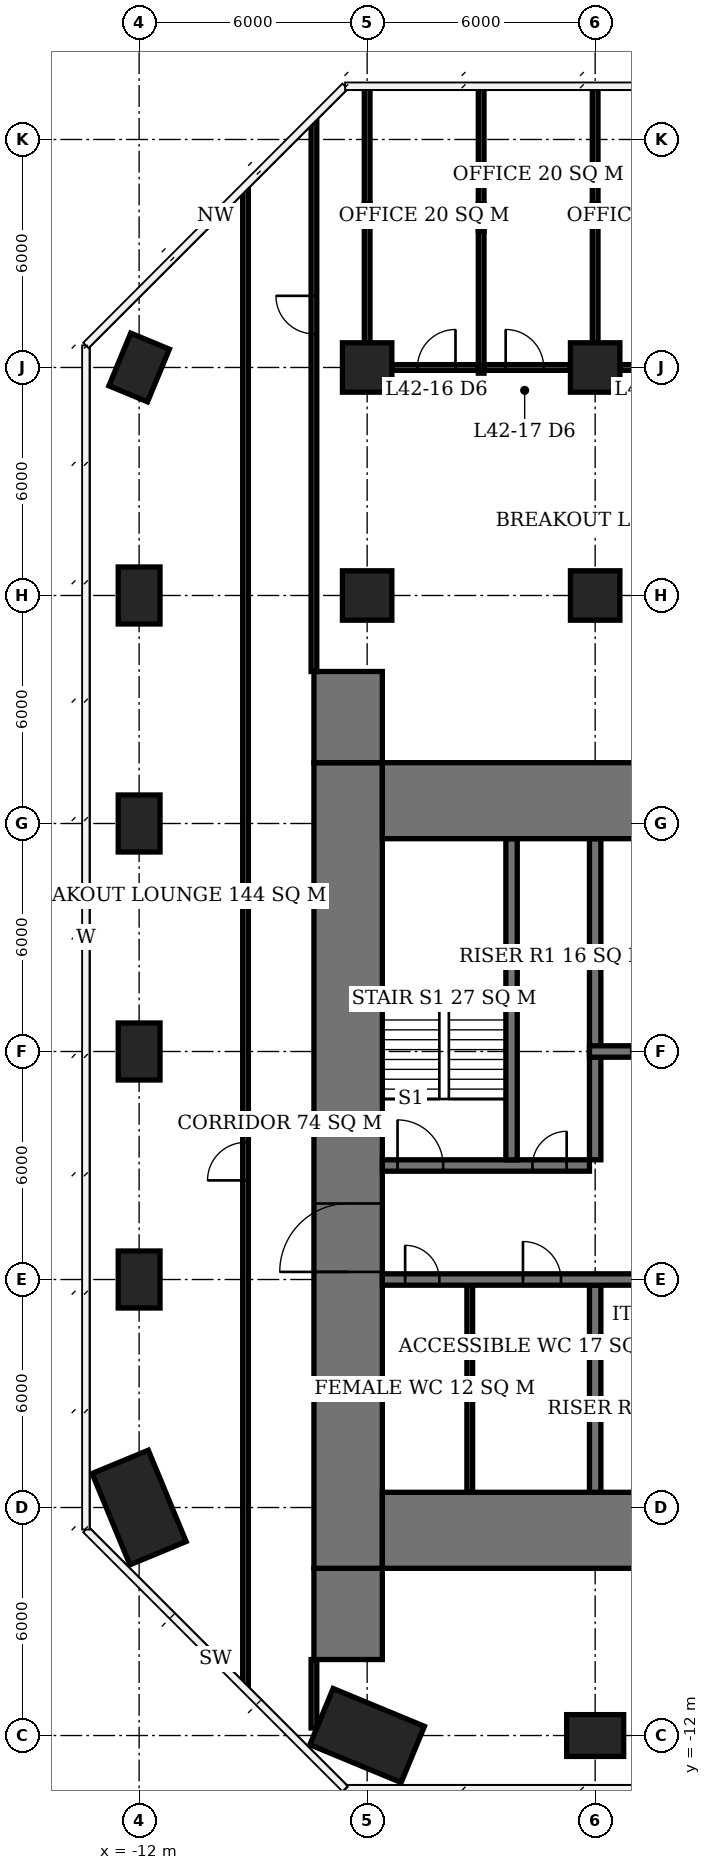
"""IFC4 building model, lengths in metres.
Left out: names, types, materials, properties, quantities, classifications, styles, units other than length and angle.
Written with IfcOpenShell. Run it as: python <this file> out.ifc"""

import sys

from ifc_helpers import new_model, si_unit, direction, frame, frame_2d, origin, origin_2d, place, context, subcontext, project, spatial, rectangle, extrude, element, fill, save


model = new_model("IFC4")
c1 = context("Model", 3, precision=1e-05, world=origin(), true_north=direction((0.0, 1.0)))
c2 = subcontext(c1, "Body", "Model", "MODEL_VIEW")
j1 = project(units=[si_unit("LENGTHUNIT", "METRE"), si_unit("PLANEANGLEUNIT", "RADIAN")], contexts=[c1])
p1 = place(None, origin())
s1 = spatial("IfcSite", under=j1, at=p1, CompositionType="ELEMENT")
p2 = place(p1, origin())
s2 = spatial("IfcBuilding", under=s1, at=p2, CompositionType="ELEMENT")
p3 = place(p2, frame((0.0, 0.0, 173.3)))
s3 = spatial("IfcBuildingStorey", under=s2, at=p3, CompositionType="ELEMENT", Elevation=173.3)
p4 = place(p3, frame((-12.0, -6.0, 0.0), z_axis=(0.0, 0.0, 1.0), x_axis=(-0.382683432365, 0.923879532511, 0.0)))
e1 = element("IfcColumn", 1, at=p4, inside=s3, PredefinedType="COLUMN", context=c2, shape_type="SweptSolid", body=[
    extrude(rectangle(XDim=2.6, YDim=1.6, at=origin_2d()), origin(), (0.0, 0.0, 1.0), 3.9),
])
for number, where, z_axis, x_axis in (
    (2, (-12.0, 0.0, 0.0), (0.0, 0.0, 1.0), (0.0, 1.0, 0.0)),
    (3, (-12.0, 6.0, 0.0), (0.0, 0.0, 1.0), (0.0, 1.0, 0.0)),
    (4, (-12.0, 12.0, 0.0), (0.0, 0.0, 1.0), (0.0, 1.0, 0.0)),
    (5, (-12.0, 18.0, 0.0), (0.0, 0.0, 1.0), (0.0, 1.0, 0.0)),
    (6, (-12.0, 24.0, 0.0), (0.0, 0.0, 1.0), (0.383, 0.924, 0.0)),
):
    element("IfcColumn", number, at=place(p3, frame(where, z_axis=z_axis, x_axis=x_axis)), inside=s3, PredefinedType="COLUMN", context=c2, shape_type="SweptSolid", body=[
        extrude(rectangle(XDim=1.5, YDim=1.1, at=origin_2d()), origin(), (0.0, 0.0, 1.0), 3.9),
    ])
p5 = place(p3, frame((-6.0, -12.0, 0.0), z_axis=(0.0, 0.0, 1.0), x_axis=(-0.923879532511, 0.382683432365, 0.0)))
e7 = element("IfcColumn", 7, at=p5, inside=s3, PredefinedType="COLUMN", context=c2, shape_type="SweptSolid", body=[
    extrude(rectangle(XDim=2.6, YDim=1.6, at=origin_2d()), origin(), (0.0, 0.0, 1.0), 3.9),
])
for number, where, z_axis, x_axis in (
    (8, (-6.0, 18.0, 0.0), (0.0, 0.0, 1.0), (1.0, 0.0, 0.0)),
    (9, (-6.0, 24.0, 0.0), (0.0, 0.0, 1.0), (1.0, 0.0, 0.0)),
):
    element("IfcColumn", number, at=place(p3, frame(where, z_axis=z_axis, x_axis=x_axis)), inside=s3, PredefinedType="COLUMN", context=c2, shape_type="SweptSolid", body=[
        extrude(rectangle(XDim=1.3, YDim=1.3, at=origin_2d()), origin(), (0.0, 0.0, 1.0), 3.9),
    ])
p6 = place(p3, frame((0.0, -12.0, 0.0), z_axis=(0.0, 0.0, 1.0), x_axis=(1.0, 0.0, 0.0)))
e10 = element("IfcColumn", 10, at=p6, inside=s3, PredefinedType="COLUMN", context=c2, shape_type="SweptSolid", body=[
    extrude(rectangle(XDim=1.5, YDim=1.1, at=origin_2d()), origin(), (0.0, 0.0, 1.0), 3.9),
])
for number, where, z_axis, x_axis in (
    (11, (0.0, 18.0, 0.0), (0.0, 0.0, 1.0), (1.0, 0.0, 0.0)),
    (12, (0.0, 24.0, 0.0), (0.0, 0.0, 1.0), (1.0, 0.0, 0.0)),
):
    element("IfcColumn", number, at=place(p3, frame(where, z_axis=z_axis, x_axis=x_axis)), inside=s3, PredefinedType="COLUMN", context=c2, shape_type="SweptSolid", body=[
        extrude(rectangle(XDim=1.3, YDim=1.3, at=origin_2d()), origin(), (0.0, 0.0, 1.0), 3.9),
    ])
for number, where, z_axis, x_axis in (
    (13, (-5.6, -6.6, 0.0), (0.0, 0.0, 1.0), (1.0, 0.0, 0.0)),
    (14, (-5.6, 12.6, 0.0), (0.0, 0.0, 1.0), (1.0, 0.0, 0.0)),
):
    element("IfcWall", number, at=place(p3, frame(where, z_axis=z_axis, x_axis=x_axis)), inside=s3, PredefinedType="SHEAR", context=c2, shape_type="SweptSolid", body=[
        extrude(rectangle(XDim=23.2, YDim=2.0, at=frame_2d((11.6, 0.0))), origin(), (0.0, 0.0, 1.0), 3.9),
    ])
p7 = place(p3, frame((-6.5, -7.6, 0.0), z_axis=(0.0, 0.0, 1.0), x_axis=(0.0, 1.0, 0.0)))
e15 = element("IfcWall", 15, at=p7, inside=s3, PredefinedType="SHEAR", context=c2, shape_type="SweptSolid", body=[
    extrude(rectangle(XDim=21.2, YDim=1.8, at=frame_2d((10.6, 0.0))), origin(), (0.0, 0.0, 1.0), 3.9),
])
p8 = place(p7, frame((7.8, 0.0, 0.0)))
e16 = element("IfcOpeningElement", 16, at=p8, cuts=e15, PredefinedType="OPENING", context=c2, shape_type="SweptSolid", body=[
    extrude(rectangle(XDim=1.8, YDim=2.4, at=frame_2d((0.9, 1.2))), frame((0.0, 0.91, 0.0), z_axis=(0.0, -1.0, 0.0), x_axis=(1.0, 0.0, 0.0)), (0.0, 0.0, 1.0), 1.82),
])
for number, where, z_axis, x_axis in (
    (17, (-6.5, -10.0, 0.0), (0.0, 0.0, 1.0), (0.0, 1.0, 0.0)),
    (18, (-6.5, 13.6, 0.0), (0.0, 0.0, 1.0), (0.0, 1.0, 0.0)),
):
    element("IfcWall", number, at=place(p3, frame(where, z_axis=z_axis, x_axis=x_axis)), inside=s3, PredefinedType="SHEAR", context=c2, shape_type="SweptSolid", body=[
        extrude(rectangle(XDim=2.4, YDim=1.8, at=frame_2d((1.2, 0.0))), origin(), (0.0, 0.0, 1.0), 3.9),
    ])
p9 = place(p3, frame((-5.6, 0.0, 0.0), z_axis=(0.0, 0.0, 1.0), x_axis=(1.0, 0.0, 0.0)))
e19 = element("IfcWall", 19, at=p9, inside=s3, PredefinedType="SHEAR", context=c2, shape_type="SweptSolid", body=[
    extrude(rectangle(XDim=17.75, YDim=0.3, at=frame_2d((8.875, 0.0))), origin(), (0.0, 0.0, 1.0), 3.9),
])
p10 = place(p9, frame((0.6, 0.0, 0.0)))
e20 = element("IfcOpeningElement", 20, at=p10, cuts=e19, PredefinedType="OPENING", context=c2, shape_type="SweptSolid", body=[
    extrude(rectangle(XDim=0.9, YDim=2.1, at=frame_2d((0.45, 1.05))), frame((0.0, 0.16, 0.0), z_axis=(0.0, -1.0, 0.0), x_axis=(1.0, 0.0, 0.0)), (0.0, 0.0, 1.0), 0.32),
])
p11 = place(p9, frame((3.7, 0.0, 0.0)))
e21 = element("IfcOpeningElement", 21, at=p11, cuts=e19, PredefinedType="OPENING", context=c2, shape_type="SweptSolid", body=[
    extrude(rectangle(XDim=1.0, YDim=2.1, at=frame_2d((0.5, 1.05))), frame((0.0, 0.16, 0.0), z_axis=(0.0, -1.0, 0.0), x_axis=(1.0, 0.0, 0.0)), (0.0, 0.0, 1.0), 0.32),
])
p12 = place(p9, frame((9.6, 0.0, 0.0)))
e22 = element("IfcOpeningElement", 22, at=p12, cuts=e19, PredefinedType="OPENING", context=c2, shape_type="SweptSolid", body=[
    extrude(rectangle(XDim=1.0, YDim=2.1, at=frame_2d((0.5, 1.05))), frame((0.0, 0.16, 0.0), z_axis=(0.0, -1.0, 0.0), x_axis=(1.0, 0.0, 0.0)), (0.0, 0.0, 1.0), 0.32),
])
p13 = place(p9, frame((12.55, 0.0, 0.0)))
e23 = element("IfcOpeningElement", 23, at=p13, cuts=e19, PredefinedType="OPENING", context=c2, shape_type="SweptSolid", body=[
    extrude(rectangle(XDim=1.1, YDim=2.1, at=frame_2d((0.55, 1.05))), frame((0.0, 0.16, 0.0), z_axis=(0.0, -1.0, 0.0), x_axis=(1.0, 0.0, 0.0)), (0.0, 0.0, 1.0), 0.32),
])
p14 = place(p9, frame((15.55, 0.0, 0.0)))
e24 = element("IfcOpeningElement", 24, at=p14, cuts=e19, PredefinedType="OPENING", context=c2, shape_type="SweptSolid", body=[
    extrude(rectangle(XDim=1.1, YDim=2.1, at=frame_2d((0.55, 1.05))), frame((0.0, 0.16, 0.0), z_axis=(0.0, -1.0, 0.0), x_axis=(1.0, 0.0, 0.0)), (0.0, 0.0, 1.0), 0.32),
])
p15 = place(p3, frame((-5.6, 3.0, 0.0), z_axis=(0.0, 0.0, 1.0), x_axis=(1.0, 0.0, 0.0)))
e25 = element("IfcWall", 25, at=p15, inside=s3, PredefinedType="SHEAR", context=c2, shape_type="SweptSolid", body=[
    extrude(rectangle(XDim=5.45, YDim=0.3, at=frame_2d((2.725, 0.0))), origin(), (0.0, 0.0, 1.0), 3.9),
])
p16 = place(p15, frame((0.4, 0.0, 0.0)))
e26 = element("IfcOpeningElement", 26, at=p16, cuts=e25, PredefinedType="OPENING", context=c2, shape_type="SweptSolid", body=[
    extrude(rectangle(XDim=1.2, YDim=2.1, at=frame_2d((0.6, 1.05))), frame((0.0, 0.16, 0.0), z_axis=(0.0, -1.0, 0.0), x_axis=(1.0, 0.0, 0.0)), (0.0, 0.0, 1.0), 0.32),
])
p17 = place(p15, frame((3.95, 0.0, 0.0)))
e27 = element("IfcOpeningElement", 27, at=p17, cuts=e25, PredefinedType="OPENING", context=c2, shape_type="SweptSolid", body=[
    extrude(rectangle(XDim=0.9, YDim=2.1, at=frame_2d((0.45, 1.05))), frame((0.0, 0.16, 0.0), z_axis=(0.0, -1.0, 0.0), x_axis=(1.0, 0.0, 0.0)), (0.0, 0.0, 1.0), 0.32),
])
p18 = place(p3, frame((-0.15, 6.0, 0.0), z_axis=(0.0, 0.0, 1.0), x_axis=(1.0, 0.0, 0.0)))
e28 = element("IfcWall", 28, at=p18, inside=s3, PredefinedType="SHEAR", context=c2, shape_type="SweptSolid", body=[
    extrude(rectangle(XDim=17.75, YDim=0.3, at=frame_2d((8.875, 0.0))), origin(), (0.0, 0.0, 1.0), 3.9),
])
p19 = place(p18, frame((13.15, 0.0, 0.0)))
e29 = element("IfcOpeningElement", 29, at=p19, cuts=e28, PredefinedType="OPENING", context=c2, shape_type="SweptSolid", body=[
    extrude(rectangle(XDim=0.9, YDim=2.1, at=frame_2d((0.45, 1.05))), frame((0.0, 0.16, 0.0), z_axis=(0.0, -1.0, 0.0), x_axis=(1.0, 0.0, 0.0)), (0.0, 0.0, 1.0), 0.32),
])
p20 = place(p18, frame((7.25, 0.0, 0.0)))
e30 = element("IfcOpeningElement", 30, at=p20, cuts=e28, PredefinedType="OPENING", context=c2, shape_type="SweptSolid", body=[
    extrude(rectangle(XDim=1.0, YDim=2.1, at=frame_2d((0.5, 1.05))), frame((0.0, 0.16, 0.0), z_axis=(0.0, -1.0, 0.0), x_axis=(1.0, 0.0, 0.0)), (0.0, 0.0, 1.0), 0.32),
])
p21 = place(p18, frame((1.1, 0.0, 0.0)))
e31 = element("IfcOpeningElement", 31, at=p21, cuts=e28, PredefinedType="OPENING", context=c2, shape_type="SweptSolid", body=[
    extrude(rectangle(XDim=1.1, YDim=2.1, at=frame_2d((0.55, 1.05))), frame((0.0, 0.16, 0.0), z_axis=(0.0, -1.0, 0.0), x_axis=(1.0, 0.0, 0.0)), (0.0, 0.0, 1.0), 0.32),
])
p22 = place(p18, frame((4.1, 0.0, 0.0)))
e32 = element("IfcOpeningElement", 32, at=p22, cuts=e28, PredefinedType="OPENING", context=c2, shape_type="SweptSolid", body=[
    extrude(rectangle(XDim=1.1, YDim=2.1, at=frame_2d((0.55, 1.05))), frame((0.0, 0.16, 0.0), z_axis=(0.0, -1.0, 0.0), x_axis=(1.0, 0.0, 0.0)), (0.0, 0.0, 1.0), 0.32),
])
p23 = place(p3, frame((0.0, -5.6, 0.0), z_axis=(0.0, 0.0, 1.0), x_axis=(0.0, 1.0, 0.0)))
e33 = element("IfcWall", 33, at=p23, inside=s3, PredefinedType="SHEAR", context=c2, shape_type="SweptSolid", body=[
    extrude(rectangle(XDim=5.45, YDim=0.3, at=frame_2d((2.725, 0.0))), origin(), (0.0, 0.0, 1.0), 3.9),
])
for number, where, z_axis, x_axis in (
    (34, (0.0, 3.15, 0.0), (0.0, 0.0, 1.0), (0.0, 1.0, 0.0)),
    (35, (-2.2, 3.15, 0.0), (0.0, 0.0, 1.0), (0.0, 1.0, 0.0)),
):
    element("IfcWall", number, at=place(p3, frame(where, z_axis=z_axis, x_axis=x_axis)), inside=s3, PredefinedType="SHEAR", context=c2, shape_type="SweptSolid", body=[
        extrude(rectangle(XDim=8.45, YDim=0.3, at=frame_2d((4.225, 0.0))), origin(), (0.0, 0.0, 1.0), 3.9),
    ])
p24 = place(p3, frame((-3.3, -5.6, 0.0), z_axis=(0.0, 0.0, 1.0), x_axis=(0.0, 1.0, 0.0)))
e36 = element("IfcWall", 36, at=p24, inside=s3, PredefinedType="PLUMBINGWALL", context=c2, shape_type="SweptSolid", body=[
    extrude(rectangle(XDim=5.45, YDim=0.15, at=frame_2d((2.725, 0.0))), origin(), (0.0, 0.0, 1.0), 3.65),
])
p25 = place(p3, frame((-5.35, 24.0, 0.0), z_axis=(0.0, 0.0, 1.0), x_axis=(1.0, 0.0, 0.0)))
e37 = element("IfcWall", 37, at=p25, inside=s3, PredefinedType="PARTITIONING", context=c2, shape_type="SweptSolid", body=[
    extrude(rectangle(XDim=2.275, YDim=0.15, at=frame_2d((1.138, 0.0))), origin(), (0.0, 0.0, 1.0), 3.65),
])
p26 = place(p25, frame((0.675, 0.0, 0.0)))
e38 = element("IfcOpeningElement", 38, at=p26, cuts=e37, PredefinedType="OPENING", context=c2, shape_type="SweptSolid", body=[
    extrude(rectangle(XDim=1.0, YDim=2.1, at=frame_2d((0.5, 1.05))), frame((0.0, 0.085, 0.0), z_axis=(0.0, -1.0, 0.0), x_axis=(1.0, 0.0, 0.0)), (0.0, 0.0, 1.0), 0.17),
])
p27 = place(p3, frame((-2.925, 24.0, 0.0), z_axis=(0.0, 0.0, 1.0), x_axis=(1.0, 0.0, 0.0)))
e39 = element("IfcWall", 39, at=p27, inside=s3, PredefinedType="PARTITIONING", context=c2, shape_type="SweptSolid", body=[
    extrude(rectangle(XDim=2.265, YDim=0.15, at=frame_2d((1.133, 0.0))), origin(), (0.0, 0.0, 1.0), 3.65),
])
p28 = place(p27, frame((0.57, 0.0, 0.0)))
e40 = element("IfcOpeningElement", 40, at=p28, cuts=e39, PredefinedType="OPENING", context=c2, shape_type="SweptSolid", body=[
    extrude(rectangle(XDim=1.0, YDim=2.1, at=frame_2d((0.5, 1.05))), frame((0.0, 0.085, 0.0), z_axis=(0.0, -1.0, 0.0), x_axis=(1.0, 0.0, 0.0)), (0.0, 0.0, 1.0), 0.17),
])
p29 = place(p3, frame((0.66, 24.0, 0.0), z_axis=(0.0, 0.0, 1.0), x_axis=(1.0, 0.0, 0.0)))
e41 = element("IfcWall", 41, at=p29, inside=s3, PredefinedType="PARTITIONING", context=c2, shape_type="SweptSolid", body=[
    extrude(rectangle(XDim=2.265, YDim=0.15, at=frame_2d((1.133, 0.0))), origin(), (0.0, 0.0, 1.0), 3.65),
])
p30 = place(p29, frame((0.695, 0.0, 0.0)))
e42 = element("IfcOpeningElement", 42, at=p30, cuts=e41, PredefinedType="OPENING", context=c2, shape_type="SweptSolid", body=[
    extrude(rectangle(XDim=1.0, YDim=2.1, at=frame_2d((0.5, 1.05))), frame((0.0, 0.085, 0.0), z_axis=(0.0, -1.0, 0.0), x_axis=(1.0, 0.0, 0.0)), (0.0, 0.0, 1.0), 0.17),
])
p31 = place(p3, frame((-6.0, 24.65, 0.0), z_axis=(0.0, 0.0, 1.0), x_axis=(0.0, 1.0, 0.0)))
e43 = element("IfcWall", 43, at=p31, inside=s3, PredefinedType="PARTITIONING", context=c2, shape_type="SweptSolid", body=[
    extrude(rectangle(XDim=3.66, YDim=0.15, at=frame_2d((1.83, 0.0))), origin(), (0.0, 0.0, 1.0), 2.65),
])
p32 = place(p3, frame((-6.0, 28.31, 0.0), z_axis=(0.0, 0.0, 1.0), x_axis=(0.0, 1.0, 0.0)))
e44 = element("IfcWall", 44, at=p32, inside=s3, PredefinedType="PARTITIONING", context=c2, shape_type="SweptSolid", body=[
    extrude(rectangle(XDim=3.09, YDim=0.15, at=frame_2d((1.545, 0.0))), origin(), (0.0, 0.0, 1.0), 3.65),
])
p33 = place(p3, frame((-3.0, 23.85, 0.0), z_axis=(0.0, 0.0, 1.0), x_axis=(0.0, 1.0, 0.0)))
e45 = element("IfcWall", 45, at=p33, inside=s3, PredefinedType="PARTITIONING", context=c2, shape_type="SweptSolid", body=[
    extrude(rectangle(XDim=3.74, YDim=0.15, at=frame_2d((1.87, 0.0))), origin(), (0.0, 0.0, 1.0), 3.65),
])
p34 = place(p3, frame((-3.0, 27.59, 0.0), z_axis=(0.0, 0.0, 1.0), x_axis=(0.0, 1.0, 0.0)))
e46 = element("IfcWall", 46, at=p34, inside=s3, PredefinedType="PARTITIONING", context=c2, shape_type="SweptSolid", body=[
    extrude(rectangle(XDim=0.72, YDim=0.15, at=frame_2d((0.36, 0.0))), origin(), (0.0, 0.0, 1.0), 2.65),
])
p35 = place(p3, frame((-3.0, 28.31, 0.0), z_axis=(0.0, 0.0, 1.0), x_axis=(0.0, 1.0, 0.0)))
e47 = element("IfcWall", 47, at=p35, inside=s3, PredefinedType="PARTITIONING", context=c2, shape_type="SweptSolid", body=[
    extrude(rectangle(XDim=3.09, YDim=0.15, at=frame_2d((1.545, 0.0))), origin(), (0.0, 0.0, 1.0), 3.65),
])
p36 = place(p3, frame((0.0, 24.65, 0.0), z_axis=(0.0, 0.0, 1.0), x_axis=(0.0, 1.0, 0.0)))
e48 = element("IfcWall", 48, at=p36, inside=s3, PredefinedType="PARTITIONING", context=c2, shape_type="SweptSolid", body=[
    extrude(rectangle(XDim=3.66, YDim=0.15, at=frame_2d((1.83, 0.0))), origin(), (0.0, 0.0, 1.0), 2.65),
])
p37 = place(p3, frame((0.0, 28.31, 0.0), z_axis=(0.0, 0.0, 1.0), x_axis=(0.0, 1.0, 0.0)))
e49 = element("IfcWall", 49, at=p37, inside=s3, PredefinedType="PARTITIONING", context=c2, shape_type="SweptSolid", body=[
    extrude(rectangle(XDim=3.09, YDim=0.15, at=frame_2d((1.545, 0.0))), origin(), (0.0, 0.0, 1.0), 3.65),
])
p38 = place(p3, frame((-9.2, -10.689, 0.0), z_axis=(0.0, 0.0, 1.0), x_axis=(0.0, 1.0, 0.0)))
e50 = element("IfcWall", 50, at=p38, inside=s3, PredefinedType="PARTITIONING", context=c2, shape_type="SweptSolid", body=[
    extrude(rectangle(XDim=39.378, YDim=0.15, at=frame_2d((19.689, 0.0))), origin(), (0.0, 0.0, 1.0), 3.65),
])
p39 = place(p38, frame((13.297, 0.0, 0.0)))
e51 = element("IfcOpeningElement", 51, at=p39, cuts=e50, PredefinedType="OPENING", context=c2, shape_type="SweptSolid", body=[
    extrude(rectangle(XDim=1.0, YDim=2.1, at=frame_2d((0.5, 1.05))), frame((0.0, 0.085, 0.0), z_axis=(0.0, -1.0, 0.0), x_axis=(1.0, 0.0, 0.0)), (0.0, 0.0, 1.0), 0.17),
])
p40 = place(p3, frame((-7.4, -11.802, 0.0), z_axis=(0.0, 0.0, 1.0), x_axis=(0.0, 1.0, 0.0)))
e52 = element("IfcWall", 52, at=p40, inside=s3, PredefinedType="PARTITIONING", context=c2, shape_type="SweptSolid", body=[
    extrude(rectangle(XDim=1.802, YDim=0.15, at=frame_2d((0.901, 0.0))), origin(), (0.0, 0.0, 1.0), 3.65),
])
p41 = place(p3, frame((-7.4, 16.0, 0.0), z_axis=(0.0, 0.0, 1.0), x_axis=(0.0, 1.0, 0.0)))
e53 = element("IfcWall", 53, at=p41, inside=s3, PredefinedType="PARTITIONING", context=c2, shape_type="SweptSolid", body=[
    extrude(rectangle(XDim=14.489, YDim=0.15, at=frame_2d((7.245, 0.0))), origin(), (0.0, 0.0, 1.0), 3.65),
])
p42 = place(p41, frame((8.885, 0.0, 0.0)))
e54 = element("IfcOpeningElement", 54, at=p42, cuts=e53, PredefinedType="OPENING", context=c2, shape_type="SweptSolid", body=[
    extrude(rectangle(XDim=1.0, YDim=2.1, at=frame_2d((0.5, 1.05))), frame((0.0, 0.085, 0.0), z_axis=(0.0, -1.0, 0.0), x_axis=(1.0, 0.0, 0.0)), (0.0, 0.0, 1.0), 0.17),
])
p43 = place(p8, origin())
e55 = element("IfcDoor", 55, at=p43, inside=s3, OperationType="DOUBLE_DOOR_SINGLE_SWING", PredefinedType="DOOR", context=c2, shape_type="SweptSolid", body=[
    extrude(rectangle(XDim=1.8, YDim=2.4, at=frame_2d((0.9, 1.2))), frame((0.0, 0.025, 0.0), z_axis=(0.0, -1.0, 0.0), x_axis=(1.0, 0.0, 0.0)), (0.0, 0.0, 1.0), 0.05),
])
fill(e16, e55)
p44 = place(p16, origin())
e56 = element("IfcDoor", 56, at=p44, inside=s3, OperationType="SINGLE_SWING_LEFT", PredefinedType="DOOR", context=c2, shape_type="SweptSolid", body=[
    extrude(rectangle(XDim=1.2, YDim=2.1, at=frame_2d((0.6, 1.05))), frame((0.0, 0.025, 0.0), z_axis=(0.0, -1.0, 0.0), x_axis=(1.0, 0.0, 0.0)), (0.0, 0.0, 1.0), 0.05),
])
fill(e26, e56)
p45 = place(p17, origin())
e57 = element("IfcDoor", 57, at=p45, inside=s3, OperationType="SINGLE_SWING_RIGHT", PredefinedType="DOOR", context=c2, shape_type="SweptSolid", body=[
    extrude(rectangle(XDim=0.9, YDim=2.1, at=frame_2d((0.45, 1.05))), frame((0.0, 0.025, 0.0), z_axis=(0.0, -1.0, 0.0), x_axis=(1.0, 0.0, 0.0)), (0.0, 0.0, 1.0), 0.05),
])
fill(e27, e57)
p46 = place(p10, origin())
e58 = element("IfcDoor", 58, at=p46, inside=s3, OperationType="SINGLE_SWING_LEFT", PredefinedType="DOOR", context=c2, shape_type="SweptSolid", body=[
    extrude(rectangle(XDim=0.9, YDim=2.1, at=frame_2d((0.45, 1.05))), frame((0.0, 0.025, 0.0), z_axis=(0.0, -1.0, 0.0), x_axis=(1.0, 0.0, 0.0)), (0.0, 0.0, 1.0), 0.05),
])
fill(e20, e58)
p47 = place(p11, origin())
e59 = element("IfcDoor", 59, at=p47, inside=s3, OperationType="SINGLE_SWING_LEFT", PredefinedType="DOOR", context=c2, shape_type="SweptSolid", body=[
    extrude(rectangle(XDim=1.0, YDim=2.1, at=frame_2d((0.5, 1.05))), frame((0.0, 0.025, 0.0), z_axis=(0.0, -1.0, 0.0), x_axis=(1.0, 0.0, 0.0)), (0.0, 0.0, 1.0), 0.05),
])
fill(e21, e59)
p48 = place(p26, origin())
e60 = element("IfcDoor", 60, at=p48, inside=s3, OperationType="SINGLE_SWING_RIGHT", PredefinedType="DOOR", context=c2, shape_type="SweptSolid", body=[
    extrude(rectangle(XDim=1.0, YDim=2.1, at=frame_2d((0.5, 1.05))), frame((0.0, 0.025, 0.0), z_axis=(0.0, -1.0, 0.0), x_axis=(1.0, 0.0, 0.0)), (0.0, 0.0, 1.0), 0.05),
])
fill(e38, e60)
p49 = place(p28, origin())
e61 = element("IfcDoor", 61, at=p49, inside=s3, OperationType="SINGLE_SWING_LEFT", PredefinedType="DOOR", context=c2, shape_type="SweptSolid", body=[
    extrude(rectangle(XDim=1.0, YDim=2.1, at=frame_2d((0.5, 1.05))), frame((0.0, 0.025, 0.0), z_axis=(0.0, -1.0, 0.0), x_axis=(1.0, 0.0, 0.0)), (0.0, 0.0, 1.0), 0.05),
])
fill(e40, e61)
p50 = place(p39, origin())
e62 = element("IfcDoor", 62, at=p50, inside=s3, OperationType="SINGLE_SWING_LEFT", PredefinedType="DOOR", context=c2, shape_type="SweptSolid", body=[
    extrude(rectangle(XDim=1.0, YDim=2.1, at=frame_2d((0.5, 1.05))), frame((0.0, 0.025, 0.0), z_axis=(0.0, -1.0, 0.0), x_axis=(1.0, 0.0, 0.0)), (0.0, 0.0, 1.0), 0.05),
])
fill(e51, e62)
p51 = place(p42, origin())
e63 = element("IfcDoor", 63, at=p51, inside=s3, OperationType="SINGLE_SWING_RIGHT", PredefinedType="DOOR", context=c2, shape_type="SweptSolid", body=[
    extrude(rectangle(XDim=1.0, YDim=2.1, at=frame_2d((0.5, 1.05))), frame((0.0, 0.025, 0.0), z_axis=(0.0, -1.0, 0.0), x_axis=(1.0, 0.0, 0.0)), (0.0, 0.0, 1.0), 0.05),
])
fill(e54, e63)
save(model, sys.argv[1])
